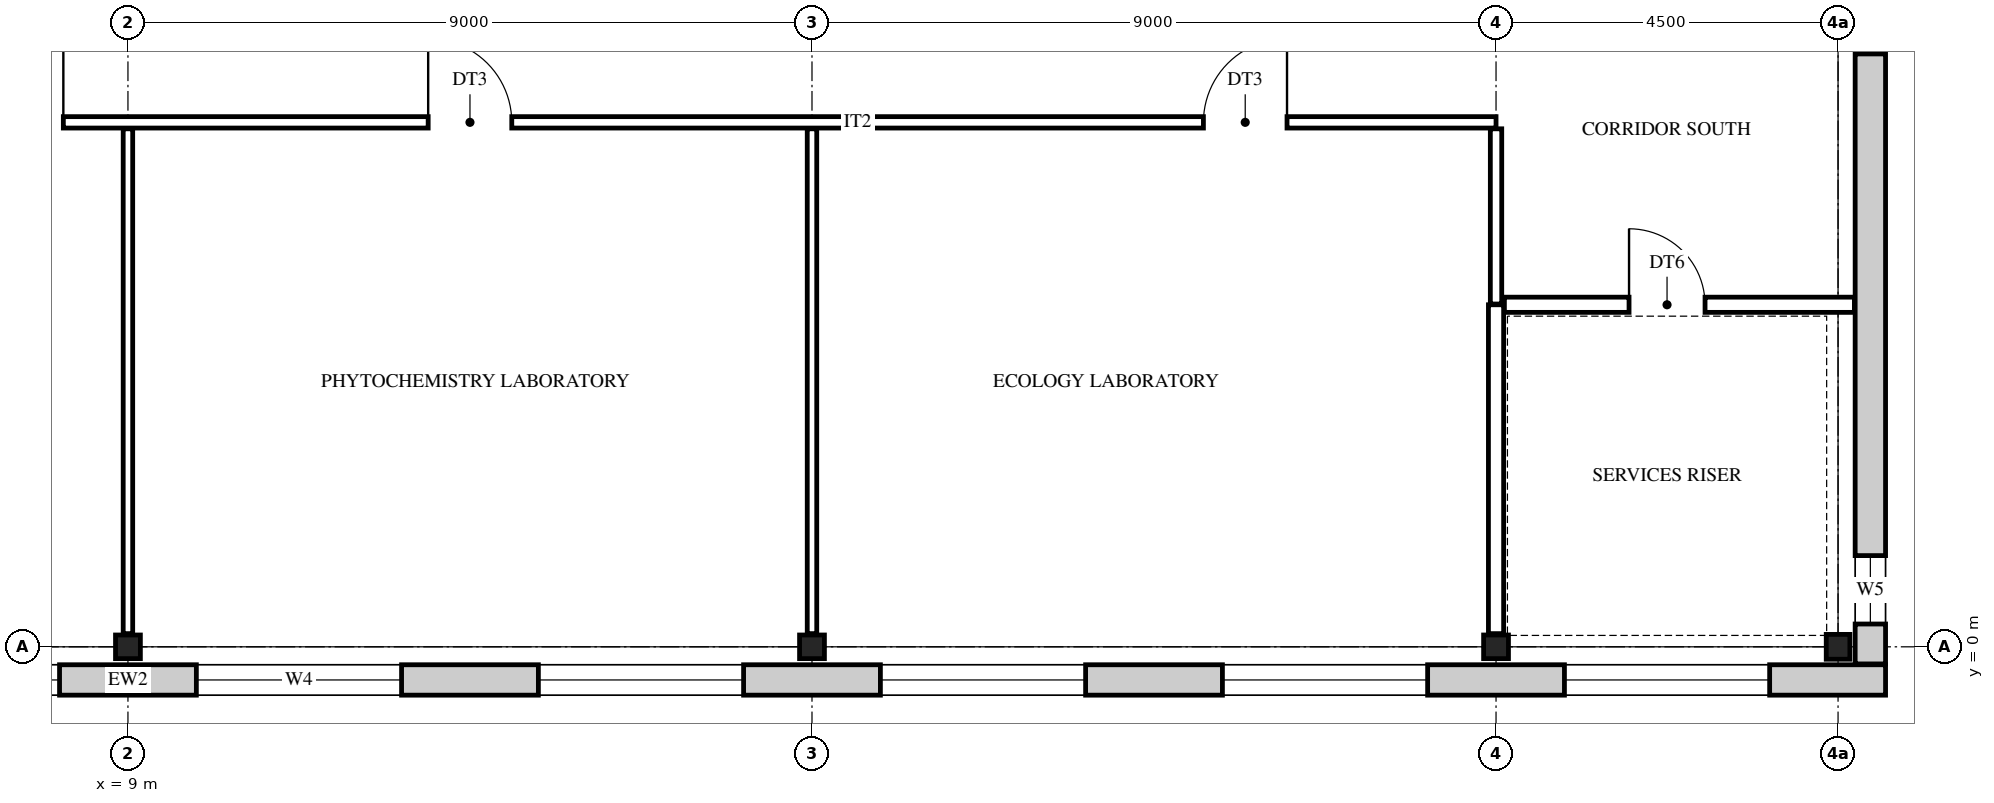
"""IFC4 building model, lengths in metres.
Left out: names, types, materials, properties, quantities, classifications, styles, units other than length and angle.
Written with IfcOpenShell. Run it as: python <this file> out.ifc"""

import sys

from ifc_helpers import new_model, si_unit, direction, frame, frame_2d, origin, origin_2d, place, context, subcontext, project, spatial, rectangle, i_section, extrude, element, fill, save


model = new_model("IFC4")
c1 = context("Model", 3, precision=1e-05, world=origin(), true_north=direction((0.0, 1.0)))
c2 = subcontext(c1, "Body", "Model", "MODEL_VIEW")
j1 = project(units=[si_unit("LENGTHUNIT", "METRE"), si_unit("PLANEANGLEUNIT", "RADIAN")], contexts=[c1])
p1 = place(None, origin())
s1 = spatial("IfcSite", under=j1, at=p1, CompositionType="ELEMENT")
p2 = place(p1, origin())
s2 = spatial("IfcBuilding", under=s1, at=p2, CompositionType="ELEMENT")
p3 = place(p2, frame((0.0, 0.0, 23.4)))
s3 = spatial("IfcBuildingStorey", under=s2, at=p3, CompositionType="ELEMENT", Elevation=23.4)
for number, where, z_axis, x_axis in (
    (1, (9.0, 0.0, 0.0), (0.0, 0.0, 1.0), (0.0, 1.0, 0.0)),
    (2, (18.0, 0.0, 0.0), (0.0, 0.0, 1.0), (0.0, 1.0, 0.0)),
    (3, (27.0, 0.0, 0.0), (0.0, 0.0, 1.0), (0.0, 1.0, 0.0)),
    (4, (31.5, 0.0, 0.0), (0.0, 0.0, 1.0), (1.0, 0.0, 0.0)),
):
    element("IfcColumn", number, at=place(p3, frame(where, z_axis=z_axis, x_axis=x_axis)), inside=s3, PredefinedType="COLUMN", context=c2, shape_type="SweptSolid", body=[
        extrude(i_section(OverallWidth=0.311, OverallDepth=0.327, WebThickness=0.016, FlangeThickness=0.025, FilletRadius=0.017, at=origin_2d()), origin(), (0.0, 0.0, 1.0), 4.2),
    ])
p4 = place(p3, frame((32.125, -0.436, 0.0), z_axis=(0.0, 0.0, 1.0), x_axis=(-1.0, 0.0, 0.0)))
e5 = element("IfcWall", 5, at=p4, inside=s3, PredefinedType="STANDARD", context=c2, shape_type="SweptSolid", body=[
    extrude(rectangle(XDim=32.75, YDim=0.4, at=frame_2d((16.375, 0.0))), origin(), (0.0, 0.0, 1.0), 4.2),
])
p5 = place(p4, frame((28.525, 0.0, 0.9)))
e6 = element("IfcOpeningElement", 6, at=p5, cuts=e5, PredefinedType="OPENING", context=c2, shape_type="SweptSolid", body=[
    extrude(rectangle(XDim=2.7, YDim=2.5, at=frame_2d((1.35, 1.25))), frame((0.0, 0.21, 0.0), z_axis=(0.0, -1.0, 0.0), x_axis=(1.0, 0.0, 0.0)), (0.0, 0.0, 1.0), 0.42),
])
p6 = place(p4, frame((24.025, 0.0, 0.9)))
e7 = element("IfcOpeningElement", 7, at=p6, cuts=e5, PredefinedType="OPENING", context=c2, shape_type="SweptSolid", body=[
    extrude(rectangle(XDim=2.7, YDim=2.5, at=frame_2d((1.35, 1.25))), frame((0.0, 0.21, 0.0), z_axis=(0.0, -1.0, 0.0), x_axis=(1.0, 0.0, 0.0)), (0.0, 0.0, 1.0), 0.42),
])
p7 = place(p4, frame((19.525, 0.0, 0.9)))
e8 = element("IfcOpeningElement", 8, at=p7, cuts=e5, PredefinedType="OPENING", context=c2, shape_type="SweptSolid", body=[
    extrude(rectangle(XDim=2.7, YDim=2.5, at=frame_2d((1.35, 1.25))), frame((0.0, 0.21, 0.0), z_axis=(0.0, -1.0, 0.0), x_axis=(1.0, 0.0, 0.0)), (0.0, 0.0, 1.0), 0.42),
])
p8 = place(p4, frame((15.025, 0.0, 0.9)))
e9 = element("IfcOpeningElement", 9, at=p8, cuts=e5, PredefinedType="OPENING", context=c2, shape_type="SweptSolid", body=[
    extrude(rectangle(XDim=2.7, YDim=2.5, at=frame_2d((1.35, 1.25))), frame((0.0, 0.21, 0.0), z_axis=(0.0, -1.0, 0.0), x_axis=(1.0, 0.0, 0.0)), (0.0, 0.0, 1.0), 0.42),
])
p9 = place(p4, frame((10.525, 0.0, 0.9)))
e10 = element("IfcOpeningElement", 10, at=p9, cuts=e5, PredefinedType="OPENING", context=c2, shape_type="SweptSolid", body=[
    extrude(rectangle(XDim=2.7, YDim=2.5, at=frame_2d((1.35, 1.25))), frame((0.0, 0.21, 0.0), z_axis=(0.0, -1.0, 0.0), x_axis=(1.0, 0.0, 0.0)), (0.0, 0.0, 1.0), 0.42),
])
p10 = place(p4, frame((6.025, 0.0, 0.9)))
e11 = element("IfcOpeningElement", 11, at=p10, cuts=e5, PredefinedType="OPENING", context=c2, shape_type="SweptSolid", body=[
    extrude(rectangle(XDim=2.7, YDim=2.5, at=frame_2d((1.35, 1.25))), frame((0.0, 0.21, 0.0), z_axis=(0.0, -1.0, 0.0), x_axis=(1.0, 0.0, 0.0)), (0.0, 0.0, 1.0), 0.42),
])
p11 = place(p4, frame((1.525, 0.0, 0.9)))
e12 = element("IfcOpeningElement", 12, at=p11, cuts=e5, PredefinedType="OPENING", context=c2, shape_type="SweptSolid", body=[
    extrude(rectangle(XDim=2.7, YDim=2.5, at=frame_2d((1.35, 1.25))), frame((0.0, 0.21, 0.0), z_axis=(0.0, -1.0, 0.0), x_axis=(1.0, 0.0, 0.0)), (0.0, 0.0, 1.0), 0.42),
])
p12 = place(p3, frame((31.925, 27.225, 0.0), z_axis=(0.0, 0.0, 1.0), x_axis=(0.0, -1.0, 0.0)))
e13 = element("IfcWall", 13, at=p12, inside=s3, PredefinedType="STANDARD", context=c2, shape_type="SweptSolid", body=[
    extrude(rectangle(XDim=27.45, YDim=0.4, at=frame_2d((13.725, 0.0))), origin(), (0.0, 0.0, 1.0), 4.2),
])
p13 = place(p12, frame((26.025, 0.0, 0.9)))
e14 = element("IfcOpeningElement", 14, at=p13, cuts=e13, PredefinedType="OPENING", context=c2, shape_type="SweptSolid", body=[
    extrude(rectangle(XDim=0.9, YDim=2.0, at=frame_2d((0.45, 1.0))), frame((0.0, 0.21, 0.0), z_axis=(0.0, -1.0, 0.0), x_axis=(1.0, 0.0, 0.0)), (0.0, 0.0, 1.0), 0.42),
])
p14 = place(p12, frame((18.525, 0.0, 0.9)))
e15 = element("IfcOpeningElement", 15, at=p14, cuts=e13, PredefinedType="OPENING", context=c2, shape_type="SweptSolid", body=[
    extrude(rectangle(XDim=0.9, YDim=2.0, at=frame_2d((0.45, 1.0))), frame((0.0, 0.21, 0.0), z_axis=(0.0, -1.0, 0.0), x_axis=(1.0, 0.0, 0.0)), (0.0, 0.0, 1.0), 0.42),
])
p15 = place(p12, frame((15.675, 0.0, 1.6)))
e16 = element("IfcOpeningElement", 16, at=p15, cuts=e13, PredefinedType="OPENING", context=c2, shape_type="SweptSolid", body=[
    extrude(rectangle(XDim=0.6, YDim=0.9, at=frame_2d((0.3, 0.45))), frame((0.0, 0.21, 0.0), z_axis=(0.0, -1.0, 0.0), x_axis=(1.0, 0.0, 0.0)), (0.0, 0.0, 1.0), 0.42),
])
p16 = place(p12, frame((11.175, 0.0, 1.6)))
e17 = element("IfcOpeningElement", 17, at=p16, cuts=e13, PredefinedType="OPENING", context=c2, shape_type="SweptSolid", body=[
    extrude(rectangle(XDim=0.6, YDim=0.9, at=frame_2d((0.3, 0.45))), frame((0.0, 0.21, 0.0), z_axis=(0.0, -1.0, 0.0), x_axis=(1.0, 0.0, 0.0)), (0.0, 0.0, 1.0), 0.42),
])
p17 = place(p12, frame((8.025, 0.0, 0.9)))
e18 = element("IfcOpeningElement", 18, at=p17, cuts=e13, PredefinedType="OPENING", context=c2, shape_type="SweptSolid", body=[
    extrude(rectangle(XDim=0.9, YDim=2.0, at=frame_2d((0.45, 1.0))), frame((0.0, 0.21, 0.0), z_axis=(0.0, -1.0, 0.0), x_axis=(1.0, 0.0, 0.0)), (0.0, 0.0, 1.0), 0.42),
])
p18 = place(p12, frame((0.525, 0.0, 0.9)))
e19 = element("IfcOpeningElement", 19, at=p18, cuts=e13, PredefinedType="OPENING", context=c2, shape_type="SweptSolid", body=[
    extrude(rectangle(XDim=0.9, YDim=2.0, at=frame_2d((0.45, 1.0))), frame((0.0, 0.21, 0.0), z_axis=(0.0, -1.0, 0.0), x_axis=(1.0, 0.0, 0.0)), (0.0, 0.0, 1.0), 0.42),
])
for number, where, z_axis, x_axis in (
    (20, (9.0, 0.174, 0.0), (0.0, 0.0, 1.0), (0.0, 1.0, 0.0)),
    (21, (18.0, 0.174, 0.0), (0.0, 0.0, 1.0), (0.0, 1.0, 0.0)),
):
    element("IfcWall", number, at=place(p3, frame(where, z_axis=z_axis, x_axis=x_axis)), inside=s3, PredefinedType="PARTITIONING", context=c2, shape_type="SweptSolid", body=[
        extrude(rectangle(XDim=6.641, YDim=0.125, at=frame_2d((3.321, 0.0))), origin(), (0.0, 0.0, 1.0), 3.537),
    ])
p19 = place(p3, frame((27.0, 0.174, 0.0), z_axis=(0.0, 0.0, 1.0), x_axis=(0.0, 1.0, 0.0)))
e22 = element("IfcWall", 22, at=p19, inside=s3, PredefinedType="PARTITIONING", context=c2, shape_type="SweptSolid", body=[
    extrude(rectangle(XDim=4.326, YDim=0.2, at=frame_2d((2.163, 0.0))), origin(), (0.0, 0.0, 1.0), 3.537),
])
p20 = place(p3, frame((27.0, 4.51, 0.0), z_axis=(0.0, 0.0, 1.0), x_axis=(0.0, 1.0, 0.0)))
e23 = element("IfcWall", 23, at=p20, inside=s3, PredefinedType="PARTITIONING", context=c2, shape_type="SweptSolid", body=[
    extrude(rectangle(XDim=2.305, YDim=0.15, at=frame_2d((1.152, 0.0))), origin(), (0.0, 0.0, 1.0), 3.537),
])
p21 = place(p3, frame((27.11, 4.5, 0.0), z_axis=(0.0, 0.0, 1.0), x_axis=(1.0, 0.0, 0.0)))
e24 = element("IfcWall", 24, at=p21, inside=s3, PredefinedType="PARTITIONING", context=c2, shape_type="SweptSolid", body=[
    extrude(rectangle(XDim=4.605, YDim=0.2, at=frame_2d((2.302, 0.0))), origin(), (0.0, 0.0, 1.0), 3.537),
])
p22 = place(p21, frame((1.64, 0.0, 0.0)))
e25 = element("IfcOpeningElement", 25, at=p22, cuts=e24, PredefinedType="OPENING", context=c2, shape_type="SweptSolid", body=[
    extrude(rectangle(XDim=1.0, YDim=2.1, at=frame_2d((0.5, 1.05))), frame((0.0, 0.11, 0.0), z_axis=(0.0, -1.0, 0.0), x_axis=(1.0, 0.0, 0.0)), (0.0, 0.0, 1.0), 0.22),
])
p23 = place(p3, frame((6.9, 6.9, 0.0), z_axis=(0.0, 0.0, 1.0), x_axis=(1.0, 0.0, 0.0)))
e26 = element("IfcWall", 26, at=p23, inside=s3, PredefinedType="PARTITIONING", context=c2, shape_type="SweptSolid", body=[
    extrude(rectangle(XDim=20.1, YDim=0.15, at=frame_2d((10.05, 0.0))), origin(), (0.0, 0.0, 1.0), 3.537),
])
p24 = place(p23, frame((0.15, 0.0, 0.0)))
e27 = element("IfcOpeningElement", 27, at=p24, cuts=e26, PredefinedType="OPENING", context=c2, shape_type="SweptSolid", body=[
    extrude(rectangle(XDim=1.1, YDim=2.1, at=frame_2d((0.55, 1.05))), frame((0.0, 0.085, 0.0), z_axis=(0.0, -1.0, 0.0), x_axis=(1.0, 0.0, 0.0)), (0.0, 0.0, 1.0), 0.17),
])
p25 = place(p23, frame((6.05, 0.0, 0.0)))
e28 = element("IfcOpeningElement", 28, at=p25, cuts=e26, PredefinedType="OPENING", context=c2, shape_type="SweptSolid", body=[
    extrude(rectangle(XDim=1.1, YDim=2.1, at=frame_2d((0.55, 1.05))), frame((0.0, 0.085, 0.0), z_axis=(0.0, -1.0, 0.0), x_axis=(1.0, 0.0, 0.0)), (0.0, 0.0, 1.0), 0.17),
])
p26 = place(p23, frame((16.25, 0.0, 0.0)))
e29 = element("IfcOpeningElement", 29, at=p26, cuts=e26, PredefinedType="OPENING", context=c2, shape_type="SweptSolid", body=[
    extrude(rectangle(XDim=1.1, YDim=2.1, at=frame_2d((0.55, 1.05))), frame((0.0, 0.085, 0.0), z_axis=(0.0, -1.0, 0.0), x_axis=(1.0, 0.0, 0.0)), (0.0, 0.0, 1.0), 0.17),
])
p27 = place(p6, origin())
e30 = element("IfcWindow", 30, at=p27, inside=s3, PartitioningType="SINGLE_PANEL", PredefinedType="WINDOW", context=c2, shape_type="SweptSolid", body=[
    extrude(rectangle(XDim=2.7, YDim=2.5, at=frame_2d((1.35, 1.25))), frame((0.0, 0.03, 0.0), z_axis=(0.0, -1.0, 0.0), x_axis=(1.0, 0.0, 0.0)), (0.0, 0.0, 1.0), 0.06),
])
fill(e7, e30)
p28 = place(p7, origin())
e31 = element("IfcWindow", 31, at=p28, inside=s3, PartitioningType="SINGLE_PANEL", PredefinedType="WINDOW", context=c2, shape_type="SweptSolid", body=[
    extrude(rectangle(XDim=2.7, YDim=2.5, at=frame_2d((1.35, 1.25))), frame((0.0, 0.03, 0.0), z_axis=(0.0, -1.0, 0.0), x_axis=(1.0, 0.0, 0.0)), (0.0, 0.0, 1.0), 0.06),
])
fill(e8, e31)
p29 = place(p8, origin())
e32 = element("IfcWindow", 32, at=p29, inside=s3, PartitioningType="SINGLE_PANEL", PredefinedType="WINDOW", context=c2, shape_type="SweptSolid", body=[
    extrude(rectangle(XDim=2.7, YDim=2.5, at=frame_2d((1.35, 1.25))), frame((0.0, 0.03, 0.0), z_axis=(0.0, -1.0, 0.0), x_axis=(1.0, 0.0, 0.0)), (0.0, 0.0, 1.0), 0.06),
])
fill(e9, e32)
p30 = place(p9, origin())
e33 = element("IfcWindow", 33, at=p30, inside=s3, PartitioningType="SINGLE_PANEL", PredefinedType="WINDOW", context=c2, shape_type="SweptSolid", body=[
    extrude(rectangle(XDim=2.7, YDim=2.5, at=frame_2d((1.35, 1.25))), frame((0.0, 0.03, 0.0), z_axis=(0.0, -1.0, 0.0), x_axis=(1.0, 0.0, 0.0)), (0.0, 0.0, 1.0), 0.06),
])
fill(e10, e33)
p31 = place(p10, origin())
e34 = element("IfcWindow", 34, at=p31, inside=s3, PartitioningType="SINGLE_PANEL", PredefinedType="WINDOW", context=c2, shape_type="SweptSolid", body=[
    extrude(rectangle(XDim=2.7, YDim=2.5, at=frame_2d((1.35, 1.25))), frame((0.0, 0.03, 0.0), z_axis=(0.0, -1.0, 0.0), x_axis=(1.0, 0.0, 0.0)), (0.0, 0.0, 1.0), 0.06),
])
fill(e11, e34)
p32 = place(p11, origin())
e35 = element("IfcWindow", 35, at=p32, inside=s3, PartitioningType="SINGLE_PANEL", PredefinedType="WINDOW", context=c2, shape_type="SweptSolid", body=[
    extrude(rectangle(XDim=2.7, YDim=2.5, at=frame_2d((1.35, 1.25))), frame((0.0, 0.03, 0.0), z_axis=(0.0, -1.0, 0.0), x_axis=(1.0, 0.0, 0.0)), (0.0, 0.0, 1.0), 0.06),
])
fill(e12, e35)
p33 = place(p13, origin())
e36 = element("IfcWindow", 36, at=p33, inside=s3, PartitioningType="SINGLE_PANEL", PredefinedType="WINDOW", context=c2, shape_type="SweptSolid", body=[
    extrude(rectangle(XDim=0.9, YDim=2.0, at=frame_2d((0.45, 1.0))), frame((0.0, 0.03, 0.0), z_axis=(0.0, -1.0, 0.0), x_axis=(1.0, 0.0, 0.0)), (0.0, 0.0, 1.0), 0.06),
])
fill(e14, e36)
p34 = place(p14, origin())
e37 = element("IfcWindow", 37, at=p34, inside=s3, PartitioningType="SINGLE_PANEL", PredefinedType="WINDOW", context=c2, shape_type="SweptSolid", body=[
    extrude(rectangle(XDim=0.9, YDim=2.0, at=frame_2d((0.45, 1.0))), frame((0.0, 0.03, 0.0), z_axis=(0.0, -1.0, 0.0), x_axis=(1.0, 0.0, 0.0)), (0.0, 0.0, 1.0), 0.06),
])
fill(e15, e37)
p35 = place(p22, frame((1.0, 0.0, 0.0), z_axis=(0.0, 0.0, 1.0), x_axis=(-1.0, 0.0, 0.0)))
e38 = element("IfcDoor", 38, at=p35, inside=s3, OperationType="SINGLE_SWING_LEFT", PredefinedType="DOOR", context=c2, shape_type="SweptSolid", body=[
    extrude(rectangle(XDim=1.0, YDim=2.1, at=frame_2d((0.5, 1.05))), frame((0.0, 0.025, 0.0), z_axis=(0.0, -1.0, 0.0), x_axis=(1.0, 0.0, 0.0)), (0.0, 0.0, 1.0), 0.05),
])
fill(e25, e38)
p36 = place(p24, frame((1.1, 0.0, 0.0), z_axis=(0.0, 0.0, 1.0), x_axis=(-1.0, 0.0, 0.0)))
e39 = element("IfcDoor", 39, at=p36, inside=s3, OperationType="SINGLE_SWING_RIGHT", PredefinedType="DOOR", context=c2, shape_type="SweptSolid", body=[
    extrude(rectangle(XDim=1.1, YDim=2.1, at=frame_2d((0.55, 1.05))), frame((0.0, 0.025, 0.0), z_axis=(0.0, -1.0, 0.0), x_axis=(1.0, 0.0, 0.0)), (0.0, 0.0, 1.0), 0.05),
])
fill(e27, e39)
p37 = place(p25, frame((1.1, 0.0, 0.0), z_axis=(0.0, 0.0, 1.0), x_axis=(-1.0, 0.0, 0.0)))
e40 = element("IfcDoor", 40, at=p37, inside=s3, OperationType="SINGLE_SWING_LEFT", PredefinedType="DOOR", context=c2, shape_type="SweptSolid", body=[
    extrude(rectangle(XDim=1.1, YDim=2.1, at=frame_2d((0.55, 1.05))), frame((0.0, 0.025, 0.0), z_axis=(0.0, -1.0, 0.0), x_axis=(1.0, 0.0, 0.0)), (0.0, 0.0, 1.0), 0.05),
])
fill(e28, e40)
p38 = place(p26, frame((1.1, 0.0, 0.0), z_axis=(0.0, 0.0, 1.0), x_axis=(-1.0, 0.0, 0.0)))
e41 = element("IfcDoor", 41, at=p38, inside=s3, OperationType="SINGLE_SWING_RIGHT", PredefinedType="DOOR", context=c2, shape_type="SweptSolid", body=[
    extrude(rectangle(XDim=1.1, YDim=2.1, at=frame_2d((0.55, 1.05))), frame((0.0, 0.025, 0.0), z_axis=(0.0, -1.0, 0.0), x_axis=(1.0, 0.0, 0.0)), (0.0, 0.0, 1.0), 0.05),
])
fill(e29, e41)
save(model, sys.argv[1])
